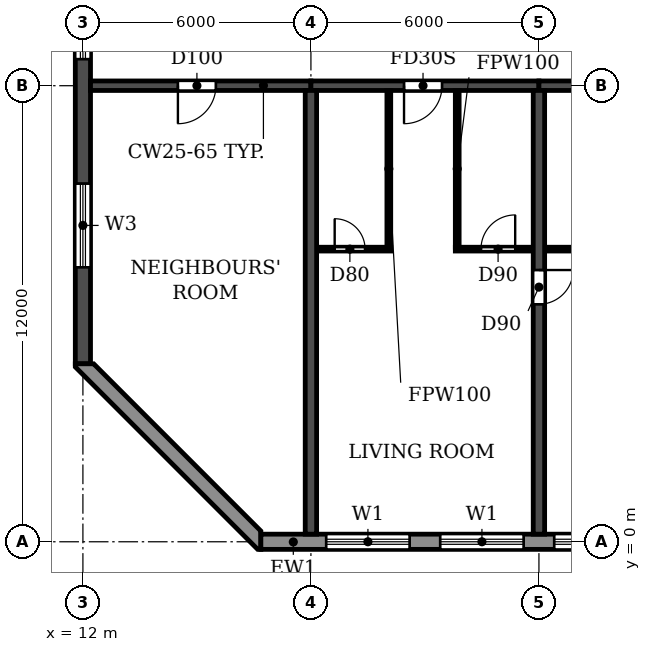
"""IFC4 building model, lengths in metres.
Left out: names, types, materials, properties, quantities, classifications, styles, units other than length and angle.
Written with IfcOpenShell. Run it as: python <this file> out.ifc"""

import sys

from ifc_helpers import new_model, si_unit, direction, frame, frame_2d, origin, place, context, subcontext, project, spatial, polyline, rectangle, outline, extrude, element, fill, save


model = new_model("IFC4")
c1 = context("Model", 3, precision=1e-05, world=origin(), true_north=direction((0.0, 1.0)))
c2 = subcontext(c1, "Body", "Model", "MODEL_VIEW")
j1 = project(units=[si_unit("LENGTHUNIT", "METRE"), si_unit("PLANEANGLEUNIT", "RADIAN")], contexts=[c1])
p1 = place(None, origin())
s1 = spatial("IfcSite", under=j1, at=p1, CompositionType="ELEMENT")
p2 = place(p1, origin())
s2 = spatial("IfcBuilding", under=s1, at=p2, CompositionType="ELEMENT")
p3 = place(p2, frame((0.0, 0.0, 122.4)))
s3 = spatial("IfcBuildingStorey", under=s2, at=p3, CompositionType="ELEMENT", Elevation=122.4)
p4 = place(p3, frame((18.0, 0.2, 0.0), z_axis=(0.0, 0.0, 1.0), x_axis=(0.0, 1.0, 0.0)))
e1 = element("IfcWall", 1, at=p4, inside=s3, PredefinedType="SHEAR", context=c2, shape_type="SweptSolid", body=[
    extrude(rectangle(XDim=11.675, YDim=0.3, at=frame_2d((5.837, 0.0))), origin(), (0.0, 0.0, 1.0), 3.07),
])
p5 = place(p3, frame((24.0, 0.2, 0.0), z_axis=(0.0, 0.0, 1.0), x_axis=(0.0, 1.0, 0.0)))
e2 = element("IfcWall", 2, at=p5, inside=s3, PredefinedType="SHEAR", context=c2, shape_type="SweptSolid", body=[
    extrude(rectangle(XDim=11.675, YDim=0.3, at=frame_2d((5.837, 0.0))), origin(), (0.0, 0.0, 1.0), 3.07),
])
p6 = place(p5, frame((6.05, 0.0, 0.0)))
e3 = element("IfcOpeningElement", 3, at=p6, cuts=e2, PredefinedType="OPENING", context=c2, shape_type="SweptSolid", body=[
    extrude(rectangle(XDim=0.9, YDim=2.1, at=frame_2d((0.45, 1.05))), frame((0.0, 0.16, 0.0), z_axis=(0.0, -1.0, 0.0), x_axis=(1.0, 0.0, 0.0)), (0.0, 0.0, 1.0), 0.32),
])
p7 = place(p3, frame((12.0, 4.683, 0.0), z_axis=(0.0, 0.0, 1.0), x_axis=(0.0, 1.0, 0.0)))
e4 = element("IfcWall", 4, at=p7, inside=s3, PredefinedType="SHEAR", context=c2, shape_type="SweptSolid", body=[
    extrude(rectangle(XDim=33.034, YDim=0.4, at=frame_2d((16.517, 0.0))), origin(), (0.0, 0.0, 1.0), 3.07),
])
p8 = place(p7, frame((23.817, 0.0, 0.9)))
e5 = element("IfcOpeningElement", 5, at=p8, cuts=e4, PredefinedType="OPENING", context=c2, shape_type="SweptSolid", body=[
    extrude(rectangle(XDim=1.2, YDim=1.5, at=frame_2d((0.6, 0.75))), frame((0.0, 0.21, 0.0), z_axis=(0.0, -1.0, 0.0), x_axis=(1.0, 0.0, 0.0)), (0.0, 0.0, 1.0), 0.42),
])
p9 = place(p7, frame((8.017, 0.0, 0.9)))
e6 = element("IfcOpeningElement", 6, at=p9, cuts=e4, PredefinedType="OPENING", context=c2, shape_type="SweptSolid", body=[
    extrude(rectangle(XDim=1.2, YDim=1.5, at=frame_2d((0.6, 0.75))), frame((0.0, 0.21, 0.0), z_axis=(0.0, -1.0, 0.0), x_axis=(1.0, 0.0, 0.0)), (0.0, 0.0, 1.0), 0.42),
])
p10 = place(p7, frame((28.293, 0.0, 0.6)))
e7 = element("IfcOpeningElement", 7, at=p10, cuts=e4, PredefinedType="OPENING", context=c2, shape_type="SweptSolid", body=[
    extrude(rectangle(XDim=2.2, YDim=1.8, at=frame_2d((1.1, 0.9))), frame((0.0, 0.21, 0.0), z_axis=(0.0, -1.0, 0.0), x_axis=(1.0, 0.0, 0.0)), (0.0, 0.0, 1.0), 0.42),
])
p11 = place(p7, frame((2.541, 0.0, 0.6)))
e8 = element("IfcOpeningElement", 8, at=p11, cuts=e4, PredefinedType="OPENING", context=c2, shape_type="SweptSolid", body=[
    extrude(rectangle(XDim=2.2, YDim=1.8, at=frame_2d((1.1, 0.9))), frame((0.0, 0.21, 0.0), z_axis=(0.0, -1.0, 0.0), x_axis=(1.0, 0.0, 0.0)), (0.0, 0.0, 1.0), 0.42),
])
p12 = place(p7, frame((12.817, 0.0, 0.6)))
e9 = element("IfcOpeningElement", 9, at=p12, cuts=e4, PredefinedType="OPENING", context=c2, shape_type="SweptSolid", body=[
    extrude(rectangle(XDim=2.2, YDim=1.8, at=frame_2d((1.1, 0.9))), frame((0.0, 0.21, 0.0), z_axis=(0.0, -1.0, 0.0), x_axis=(1.0, 0.0, 0.0)), (0.0, 0.0, 1.0), 0.42),
])
p13 = place(p3, frame((12.2, 12.0, 0.0), z_axis=(0.0, 0.0, 1.0), x_axis=(1.0, 0.0, 0.0)))
e10 = element("IfcWall", 10, at=p13, inside=s3, PredefinedType="SHEAR", context=c2, shape_type="SweptSolid", body=[
    extrude(rectangle(XDim=5.8, YDim=0.25, at=frame_2d((2.9, 0.0))), origin(), (0.0, 0.0, 1.0), 2.47),
])
p14 = place(p13, frame((2.3, 0.0, 0.0)))
e11 = element("IfcOpeningElement", 11, at=p14, cuts=e10, PredefinedType="OPENING", context=c2, shape_type="SweptSolid", body=[
    extrude(rectangle(XDim=1.0, YDim=2.1, at=frame_2d((0.5, 1.05))), frame((0.0, 0.135, 0.0), z_axis=(0.0, -1.0, 0.0), x_axis=(1.0, 0.0, 0.0)), (0.0, 0.0, 1.0), 0.27),
])
p15 = place(p3, frame((18.0, 12.0, 0.0), z_axis=(0.0, 0.0, 1.0), x_axis=(1.0, 0.0, 0.0)))
e12 = element("IfcWall", 12, at=p15, inside=s3, PredefinedType="SHEAR", context=c2, shape_type="SweptSolid", body=[
    extrude(rectangle(XDim=6.0, YDim=0.25, at=frame_2d((3.0, 0.0))), origin(), (0.0, 0.0, 1.0), 2.47),
])
p16 = place(p15, frame((2.45, 0.0, 0.0)))
e13 = element("IfcOpeningElement", 13, at=p16, cuts=e12, PredefinedType="OPENING", context=c2, shape_type="SweptSolid", body=[
    extrude(rectangle(XDim=1.0, YDim=2.1, at=frame_2d((0.5, 1.05))), frame((0.0, 0.135, 0.0), z_axis=(0.0, -1.0, 0.0), x_axis=(1.0, 0.0, 0.0)), (0.0, 0.0, 1.0), 0.27),
])
p17 = place(p3, frame((24.0, 12.0, 0.0), z_axis=(0.0, 0.0, 1.0), x_axis=(1.0, 0.0, 0.0)))
e14 = element("IfcWall", 14, at=p17, inside=s3, PredefinedType="SHEAR", context=c2, shape_type="SweptSolid", body=[
    extrude(rectangle(XDim=6.0, YDim=0.25, at=frame_2d((3.0, 0.0))), origin(), (0.0, 0.0, 1.0), 2.47),
])
p18 = place(p3, frame((16.683, 0.0, 0.0), z_axis=(0.0, 0.0, 1.0), x_axis=(1.0, 0.0, 0.0)))
e15 = element("IfcWall", 15, at=p18, inside=s3, PredefinedType="STANDARD", context=c2, shape_type="SweptSolid", body=[
    extrude(rectangle(XDim=68.634, YDim=0.4, at=frame_2d((34.317, 0.0))), origin(), (0.0, 0.0, 1.0), 3.07),
])
p19 = place(p18, frame((1.717, 0.0, 0.9)))
e16 = element("IfcOpeningElement", 16, at=p19, cuts=e15, PredefinedType="OPENING", context=c2, shape_type="SweptSolid", body=[
    extrude(rectangle(XDim=2.2, YDim=1.5, at=frame_2d((1.1, 0.75))), frame((0.0, 0.21, 0.0), z_axis=(0.0, -1.0, 0.0), x_axis=(1.0, 0.0, 0.0)), (0.0, 0.0, 1.0), 0.42),
])
p20 = place(p18, frame((4.717, 0.0, 0.9)))
e17 = element("IfcOpeningElement", 17, at=p20, cuts=e15, PredefinedType="OPENING", context=c2, shape_type="SweptSolid", body=[
    extrude(rectangle(XDim=2.2, YDim=1.5, at=frame_2d((1.1, 0.75))), frame((0.0, 0.21, 0.0), z_axis=(0.0, -1.0, 0.0), x_axis=(1.0, 0.0, 0.0)), (0.0, 0.0, 1.0), 0.42),
])
p21 = place(p18, frame((7.717, 0.0, 0.9)))
e18 = element("IfcOpeningElement", 18, at=p21, cuts=e15, PredefinedType="OPENING", context=c2, shape_type="SweptSolid", body=[
    extrude(rectangle(XDim=2.2, YDim=1.5, at=frame_2d((1.1, 0.75))), frame((0.0, 0.21, 0.0), z_axis=(0.0, -1.0, 0.0), x_axis=(1.0, 0.0, 0.0)), (0.0, 0.0, 1.0), 0.42),
])
p22 = place(p18, frame((10.717, 0.0, 0.9)))
e19 = element("IfcOpeningElement", 19, at=p22, cuts=e15, PredefinedType="OPENING", context=c2, shape_type="SweptSolid", body=[
    extrude(rectangle(XDim=2.2, YDim=1.5, at=frame_2d((1.1, 0.75))), frame((0.0, 0.21, 0.0), z_axis=(0.0, -1.0, 0.0), x_axis=(1.0, 0.0, 0.0)), (0.0, 0.0, 1.0), 0.42),
])
p23 = place(p18, frame((13.717, 0.0, 0.9)))
e20 = element("IfcOpeningElement", 20, at=p23, cuts=e15, PredefinedType="OPENING", context=c2, shape_type="SweptSolid", body=[
    extrude(rectangle(XDim=2.2, YDim=1.5, at=frame_2d((1.1, 0.75))), frame((0.0, 0.21, 0.0), z_axis=(0.0, -1.0, 0.0), x_axis=(1.0, 0.0, 0.0)), (0.0, 0.0, 1.0), 0.42),
])
p24 = place(p18, frame((16.717, 0.0, 0.9)))
e21 = element("IfcOpeningElement", 21, at=p24, cuts=e15, PredefinedType="OPENING", context=c2, shape_type="SweptSolid", body=[
    extrude(rectangle(XDim=2.2, YDim=1.5, at=frame_2d((1.1, 0.75))), frame((0.0, 0.21, 0.0), z_axis=(0.0, -1.0, 0.0), x_axis=(1.0, 0.0, 0.0)), (0.0, 0.0, 1.0), 0.42),
])
p25 = place(p18, frame((19.717, 0.0, 0.9)))
e22 = element("IfcOpeningElement", 22, at=p25, cuts=e15, PredefinedType="OPENING", context=c2, shape_type="SweptSolid", body=[
    extrude(rectangle(XDim=2.2, YDim=1.5, at=frame_2d((1.1, 0.75))), frame((0.0, 0.21, 0.0), z_axis=(0.0, -1.0, 0.0), x_axis=(1.0, 0.0, 0.0)), (0.0, 0.0, 1.0), 0.42),
])
p26 = place(p18, frame((22.917, 0.0, 0.0)))
e23 = element("IfcOpeningElement", 23, at=p26, cuts=e15, PredefinedType="OPENING", context=c2, shape_type="SweptSolid", body=[
    extrude(rectangle(XDim=1.8, YDim=2.4, at=frame_2d((0.9, 1.2))), frame((0.0, 0.21, 0.0), z_axis=(0.0, -1.0, 0.0), x_axis=(1.0, 0.0, 0.0)), (0.0, 0.0, 1.0), 0.42),
])
p27 = place(p18, frame((25.717, 0.0, 0.9)))
e24 = element("IfcOpeningElement", 24, at=p27, cuts=e15, PredefinedType="OPENING", context=c2, shape_type="SweptSolid", body=[
    extrude(rectangle(XDim=2.2, YDim=1.5, at=frame_2d((1.1, 0.75))), frame((0.0, 0.21, 0.0), z_axis=(0.0, -1.0, 0.0), x_axis=(1.0, 0.0, 0.0)), (0.0, 0.0, 1.0), 0.42),
])
p28 = place(p18, frame((28.717, 0.0, 0.9)))
e25 = element("IfcOpeningElement", 25, at=p28, cuts=e15, PredefinedType="OPENING", context=c2, shape_type="SweptSolid", body=[
    extrude(rectangle(XDim=2.2, YDim=1.5, at=frame_2d((1.1, 0.75))), frame((0.0, 0.21, 0.0), z_axis=(0.0, -1.0, 0.0), x_axis=(1.0, 0.0, 0.0)), (0.0, 0.0, 1.0), 0.42),
])
p29 = place(p18, frame((31.717, 0.0, 0.9)))
e26 = element("IfcOpeningElement", 26, at=p29, cuts=e15, PredefinedType="OPENING", context=c2, shape_type="SweptSolid", body=[
    extrude(rectangle(XDim=2.2, YDim=1.5, at=frame_2d((1.1, 0.75))), frame((0.0, 0.21, 0.0), z_axis=(0.0, -1.0, 0.0), x_axis=(1.0, 0.0, 0.0)), (0.0, 0.0, 1.0), 0.42),
])
p30 = place(p18, frame((34.917, 0.0, 0.0)))
e27 = element("IfcOpeningElement", 27, at=p30, cuts=e15, PredefinedType="OPENING", context=c2, shape_type="SweptSolid", body=[
    extrude(rectangle(XDim=1.8, YDim=2.4, at=frame_2d((0.9, 1.2))), frame((0.0, 0.21, 0.0), z_axis=(0.0, -1.0, 0.0), x_axis=(1.0, 0.0, 0.0)), (0.0, 0.0, 1.0), 0.42),
])
p31 = place(p18, frame((37.717, 0.0, 0.9)))
e28 = element("IfcOpeningElement", 28, at=p31, cuts=e15, PredefinedType="OPENING", context=c2, shape_type="SweptSolid", body=[
    extrude(rectangle(XDim=2.2, YDim=1.5, at=frame_2d((1.1, 0.75))), frame((0.0, 0.21, 0.0), z_axis=(0.0, -1.0, 0.0), x_axis=(1.0, 0.0, 0.0)), (0.0, 0.0, 1.0), 0.42),
])
p32 = place(p18, frame((40.717, 0.0, 0.9)))
e29 = element("IfcOpeningElement", 29, at=p32, cuts=e15, PredefinedType="OPENING", context=c2, shape_type="SweptSolid", body=[
    extrude(rectangle(XDim=2.2, YDim=1.5, at=frame_2d((1.1, 0.75))), frame((0.0, 0.21, 0.0), z_axis=(0.0, -1.0, 0.0), x_axis=(1.0, 0.0, 0.0)), (0.0, 0.0, 1.0), 0.42),
])
p33 = place(p18, frame((43.717, 0.0, 0.9)))
e30 = element("IfcOpeningElement", 30, at=p33, cuts=e15, PredefinedType="OPENING", context=c2, shape_type="SweptSolid", body=[
    extrude(rectangle(XDim=2.2, YDim=1.5, at=frame_2d((1.1, 0.75))), frame((0.0, 0.21, 0.0), z_axis=(0.0, -1.0, 0.0), x_axis=(1.0, 0.0, 0.0)), (0.0, 0.0, 1.0), 0.42),
])
p34 = place(p18, frame((46.917, 0.0, 0.0)))
e31 = element("IfcOpeningElement", 31, at=p34, cuts=e15, PredefinedType="OPENING", context=c2, shape_type="SweptSolid", body=[
    extrude(rectangle(XDim=1.8, YDim=2.4, at=frame_2d((0.9, 1.2))), frame((0.0, 0.21, 0.0), z_axis=(0.0, -1.0, 0.0), x_axis=(1.0, 0.0, 0.0)), (0.0, 0.0, 1.0), 0.42),
])
p35 = place(p18, frame((49.717, 0.0, 0.9)))
e32 = element("IfcOpeningElement", 32, at=p35, cuts=e15, PredefinedType="OPENING", context=c2, shape_type="SweptSolid", body=[
    extrude(rectangle(XDim=2.2, YDim=1.5, at=frame_2d((1.1, 0.75))), frame((0.0, 0.21, 0.0), z_axis=(0.0, -1.0, 0.0), x_axis=(1.0, 0.0, 0.0)), (0.0, 0.0, 1.0), 0.42),
])
p36 = place(p18, frame((52.717, 0.0, 0.9)))
e33 = element("IfcOpeningElement", 33, at=p36, cuts=e15, PredefinedType="OPENING", context=c2, shape_type="SweptSolid", body=[
    extrude(rectangle(XDim=2.2, YDim=1.5, at=frame_2d((1.1, 0.75))), frame((0.0, 0.21, 0.0), z_axis=(0.0, -1.0, 0.0), x_axis=(1.0, 0.0, 0.0)), (0.0, 0.0, 1.0), 0.42),
])
p37 = place(p18, frame((55.717, 0.0, 0.9)))
e34 = element("IfcOpeningElement", 34, at=p37, cuts=e15, PredefinedType="OPENING", context=c2, shape_type="SweptSolid", body=[
    extrude(rectangle(XDim=2.2, YDim=1.5, at=frame_2d((1.1, 0.75))), frame((0.0, 0.21, 0.0), z_axis=(0.0, -1.0, 0.0), x_axis=(1.0, 0.0, 0.0)), (0.0, 0.0, 1.0), 0.42),
])
p38 = place(p18, frame((58.917, 0.0, 0.0)))
e35 = element("IfcOpeningElement", 35, at=p38, cuts=e15, PredefinedType="OPENING", context=c2, shape_type="SweptSolid", body=[
    extrude(rectangle(XDim=1.8, YDim=2.4, at=frame_2d((0.9, 1.2))), frame((0.0, 0.21, 0.0), z_axis=(0.0, -1.0, 0.0), x_axis=(1.0, 0.0, 0.0)), (0.0, 0.0, 1.0), 0.42),
])
p39 = place(p18, frame((61.717, 0.0, 0.9)))
e36 = element("IfcOpeningElement", 36, at=p39, cuts=e15, PredefinedType="OPENING", context=c2, shape_type="SweptSolid", body=[
    extrude(rectangle(XDim=2.2, YDim=1.5, at=frame_2d((1.1, 0.75))), frame((0.0, 0.21, 0.0), z_axis=(0.0, -1.0, 0.0), x_axis=(1.0, 0.0, 0.0)), (0.0, 0.0, 1.0), 0.42),
])
p40 = place(p18, frame((64.717, 0.0, 0.9)))
e37 = element("IfcOpeningElement", 37, at=p40, cuts=e15, PredefinedType="OPENING", context=c2, shape_type="SweptSolid", body=[
    extrude(rectangle(XDim=2.2, YDim=1.5, at=frame_2d((1.1, 0.75))), frame((0.0, 0.21, 0.0), z_axis=(0.0, -1.0, 0.0), x_axis=(1.0, 0.0, 0.0)), (0.0, 0.0, 1.0), 0.42),
])
p41 = place(p3, origin())
e38 = element("IfcWall", 38, at=p41, inside=s3, PredefinedType="STANDARD", context=c2, shape_type="SweptSolid", body=[
    extrude(outline(polyline([(11.8, 4.683), (11.8, 4.6), (16.6, -0.2), (16.683, -0.2), (16.683, 0.283), (12.283, 4.683), (11.8, 4.683)])), origin(), (0.0, 0.0, 1.0), 3.07),
])
p42 = place(p3, frame((18.16, 7.7, 0.0), z_axis=(0.0, 0.0, 1.0), x_axis=(1.0, 0.0, 0.0)))
e39 = element("IfcWall", 39, at=p42, inside=s3, PredefinedType="PARTITIONING", context=c2, shape_type="SweptSolid", body=[
    extrude(rectangle(XDim=1.94, YDim=0.1, at=frame_2d((0.97, 0.0))), origin(), (0.0, 0.0, 1.0), 3.07),
])
p43 = place(p42, frame((0.465, 0.0, 0.0)))
e40 = element("IfcOpeningElement", 40, at=p43, cuts=e39, PredefinedType="OPENING", context=c2, shape_type="SweptSolid", body=[
    extrude(rectangle(XDim=0.8, YDim=2.1, at=frame_2d((0.4, 1.05))), frame((0.0, 0.06, 0.0), z_axis=(0.0, -1.0, 0.0), x_axis=(1.0, 0.0, 0.0)), (0.0, 0.0, 1.0), 0.12),
])
p44 = place(p3, frame((21.8, 7.7, 0.0), z_axis=(0.0, 0.0, 1.0), x_axis=(1.0, 0.0, 0.0)))
e41 = element("IfcWall", 41, at=p44, inside=s3, PredefinedType="PARTITIONING", context=c2, shape_type="SweptSolid", body=[
    extrude(rectangle(XDim=2.04, YDim=0.1, at=frame_2d((1.02, 0.0))), origin(), (0.0, 0.0, 1.0), 3.07),
])
p45 = place(p44, frame((0.675, 0.0, 0.0)))
e42 = element("IfcOpeningElement", 42, at=p45, cuts=e41, PredefinedType="OPENING", context=c2, shape_type="SweptSolid", body=[
    extrude(rectangle(XDim=0.9, YDim=2.1, at=frame_2d((0.45, 1.05))), frame((0.0, 0.06, 0.0), z_axis=(0.0, -1.0, 0.0), x_axis=(1.0, 0.0, 0.0)), (0.0, 0.0, 1.0), 0.12),
])
p46 = place(p3, frame((24.16, 7.7, 0.0), z_axis=(0.0, 0.0, 1.0), x_axis=(1.0, 0.0, 0.0)))
e43 = element("IfcWall", 43, at=p46, inside=s3, PredefinedType="PARTITIONING", context=c2, shape_type="SweptSolid", body=[
    extrude(rectangle(XDim=2.74, YDim=0.1, at=frame_2d((1.37, 0.0))), origin(), (0.0, 0.0, 1.0), 3.07),
])
p47 = place(p46, frame((0.94, 0.0, 0.0)))
e44 = element("IfcOpeningElement", 44, at=p47, cuts=e43, PredefinedType="OPENING", context=c2, shape_type="SweptSolid", body=[
    extrude(rectangle(XDim=0.8, YDim=2.1, at=frame_2d((0.4, 1.05))), frame((0.0, 0.06, 0.0), z_axis=(0.0, -1.0, 0.0), x_axis=(1.0, 0.0, 0.0)), (0.0, 0.0, 1.0), 0.12),
])
for number, where, z_axis, x_axis in (
    (45, (20.05, 7.75, 0.0), (0.0, 0.0, 1.0), (0.0, 1.0, 0.0)),
    (46, (21.85, 7.75, 0.0), (0.0, 0.0, 1.0), (0.0, 1.0, 0.0)),
):
    element("IfcWall", number, at=place(p3, frame(where, z_axis=z_axis, x_axis=x_axis)), inside=s3, PredefinedType="PARTITIONING", context=c2, shape_type="SweptSolid", body=[
        extrude(rectangle(XDim=4.115, YDim=0.1, at=frame_2d((2.058, 0.0))), origin(), (0.0, 0.0, 1.0), 3.07),
    ])
p48 = place(p19, origin())
e47 = element("IfcWindow", 47, at=p48, inside=s3, PartitioningType="DOUBLE_PANEL_HORIZONTAL", PredefinedType="WINDOW", context=c2, shape_type="SweptSolid", body=[
    extrude(rectangle(XDim=2.2, YDim=1.5, at=frame_2d((1.1, 0.75))), frame((0.0, 0.03, 0.0), z_axis=(0.0, -1.0, 0.0), x_axis=(1.0, 0.0, 0.0)), (0.0, 0.0, 1.0), 0.06),
])
fill(e16, e47)
p49 = place(p20, origin())
e48 = element("IfcWindow", 48, at=p49, inside=s3, PartitioningType="DOUBLE_PANEL_HORIZONTAL", PredefinedType="WINDOW", context=c2, shape_type="SweptSolid", body=[
    extrude(rectangle(XDim=2.2, YDim=1.5, at=frame_2d((1.1, 0.75))), frame((0.0, 0.03, 0.0), z_axis=(0.0, -1.0, 0.0), x_axis=(1.0, 0.0, 0.0)), (0.0, 0.0, 1.0), 0.06),
])
fill(e17, e48)
p50 = place(p21, origin())
e49 = element("IfcWindow", 49, at=p50, inside=s3, PartitioningType="DOUBLE_PANEL_HORIZONTAL", PredefinedType="WINDOW", context=c2, shape_type="SweptSolid", body=[
    extrude(rectangle(XDim=2.2, YDim=1.5, at=frame_2d((1.1, 0.75))), frame((0.0, 0.03, 0.0), z_axis=(0.0, -1.0, 0.0), x_axis=(1.0, 0.0, 0.0)), (0.0, 0.0, 1.0), 0.06),
])
fill(e18, e49)
p51 = place(p9, origin())
e50 = element("IfcWindow", 50, at=p51, inside=s3, PartitioningType="SINGLE_PANEL", PredefinedType="WINDOW", context=c2, shape_type="SweptSolid", body=[
    extrude(rectangle(XDim=1.2, YDim=1.5, at=frame_2d((0.6, 0.75))), frame((0.0, 0.03, 0.0), z_axis=(0.0, -1.0, 0.0), x_axis=(1.0, 0.0, 0.0)), (0.0, 0.0, 1.0), 0.06),
])
fill(e6, e50)
p52 = place(p11, origin())
e51 = element("IfcWindow", 51, at=p52, inside=s3, PartitioningType="DOUBLE_PANEL_HORIZONTAL", PredefinedType="WINDOW", context=c2, shape_type="SweptSolid", body=[
    extrude(rectangle(XDim=2.2, YDim=1.8, at=frame_2d((1.1, 0.9))), frame((0.0, 0.03, 0.0), z_axis=(0.0, -1.0, 0.0), x_axis=(1.0, 0.0, 0.0)), (0.0, 0.0, 1.0), 0.06),
])
fill(e8, e51)
p53 = place(p14, frame((1.0, 0.0, 0.0), z_axis=(0.0, 0.0, 1.0), x_axis=(-1.0, 0.0, 0.0)))
e52 = element("IfcDoor", 52, at=p53, inside=s3, OperationType="SINGLE_SWING_RIGHT", PredefinedType="DOOR", context=c2, shape_type="SweptSolid", body=[
    extrude(rectangle(XDim=1.0, YDim=2.1, at=frame_2d((0.5, 1.05))), frame((0.0, 0.025, 0.0), z_axis=(0.0, -1.0, 0.0), x_axis=(1.0, 0.0, 0.0)), (0.0, 0.0, 1.0), 0.05),
])
fill(e11, e52)
p54 = place(p43, origin())
e53 = element("IfcDoor", 53, at=p54, inside=s3, OperationType="SINGLE_SWING_LEFT", PredefinedType="DOOR", context=c2, shape_type="SweptSolid", body=[
    extrude(rectangle(XDim=0.8, YDim=2.1, at=frame_2d((0.4, 1.05))), frame((0.0, 0.025, 0.0), z_axis=(0.0, -1.0, 0.0), x_axis=(1.0, 0.0, 0.0)), (0.0, 0.0, 1.0), 0.05),
])
fill(e40, e53)
p55 = place(p16, frame((1.0, 0.0, 0.0), z_axis=(0.0, 0.0, 1.0), x_axis=(-1.0, 0.0, 0.0)))
e54 = element("IfcDoor", 54, at=p55, inside=s3, OperationType="SINGLE_SWING_RIGHT", PredefinedType="DOOR", context=c2, shape_type="SweptSolid", body=[
    extrude(rectangle(XDim=1.0, YDim=2.1, at=frame_2d((0.5, 1.05))), frame((0.0, 0.025, 0.0), z_axis=(0.0, -1.0, 0.0), x_axis=(1.0, 0.0, 0.0)), (0.0, 0.0, 1.0), 0.05),
])
fill(e13, e54)
p56 = place(p45, origin())
e55 = element("IfcDoor", 55, at=p56, inside=s3, OperationType="SINGLE_SWING_RIGHT", PredefinedType="DOOR", context=c2, shape_type="SweptSolid", body=[
    extrude(rectangle(XDim=0.9, YDim=2.1, at=frame_2d((0.45, 1.05))), frame((0.0, 0.025, 0.0), z_axis=(0.0, -1.0, 0.0), x_axis=(1.0, 0.0, 0.0)), (0.0, 0.0, 1.0), 0.05),
])
fill(e42, e55)
p57 = place(p6, frame((0.9, 0.0, 0.0), z_axis=(0.0, 0.0, 1.0), x_axis=(-1.0, 0.0, 0.0)))
e56 = element("IfcDoor", 56, at=p57, inside=s3, OperationType="SINGLE_SWING_LEFT", PredefinedType="DOOR", context=c2, shape_type="SweptSolid", body=[
    extrude(rectangle(XDim=0.9, YDim=2.1, at=frame_2d((0.45, 1.05))), frame((0.0, 0.025, 0.0), z_axis=(0.0, -1.0, 0.0), x_axis=(1.0, 0.0, 0.0)), (0.0, 0.0, 1.0), 0.05),
])
fill(e3, e56)
save(model, sys.argv[1])
